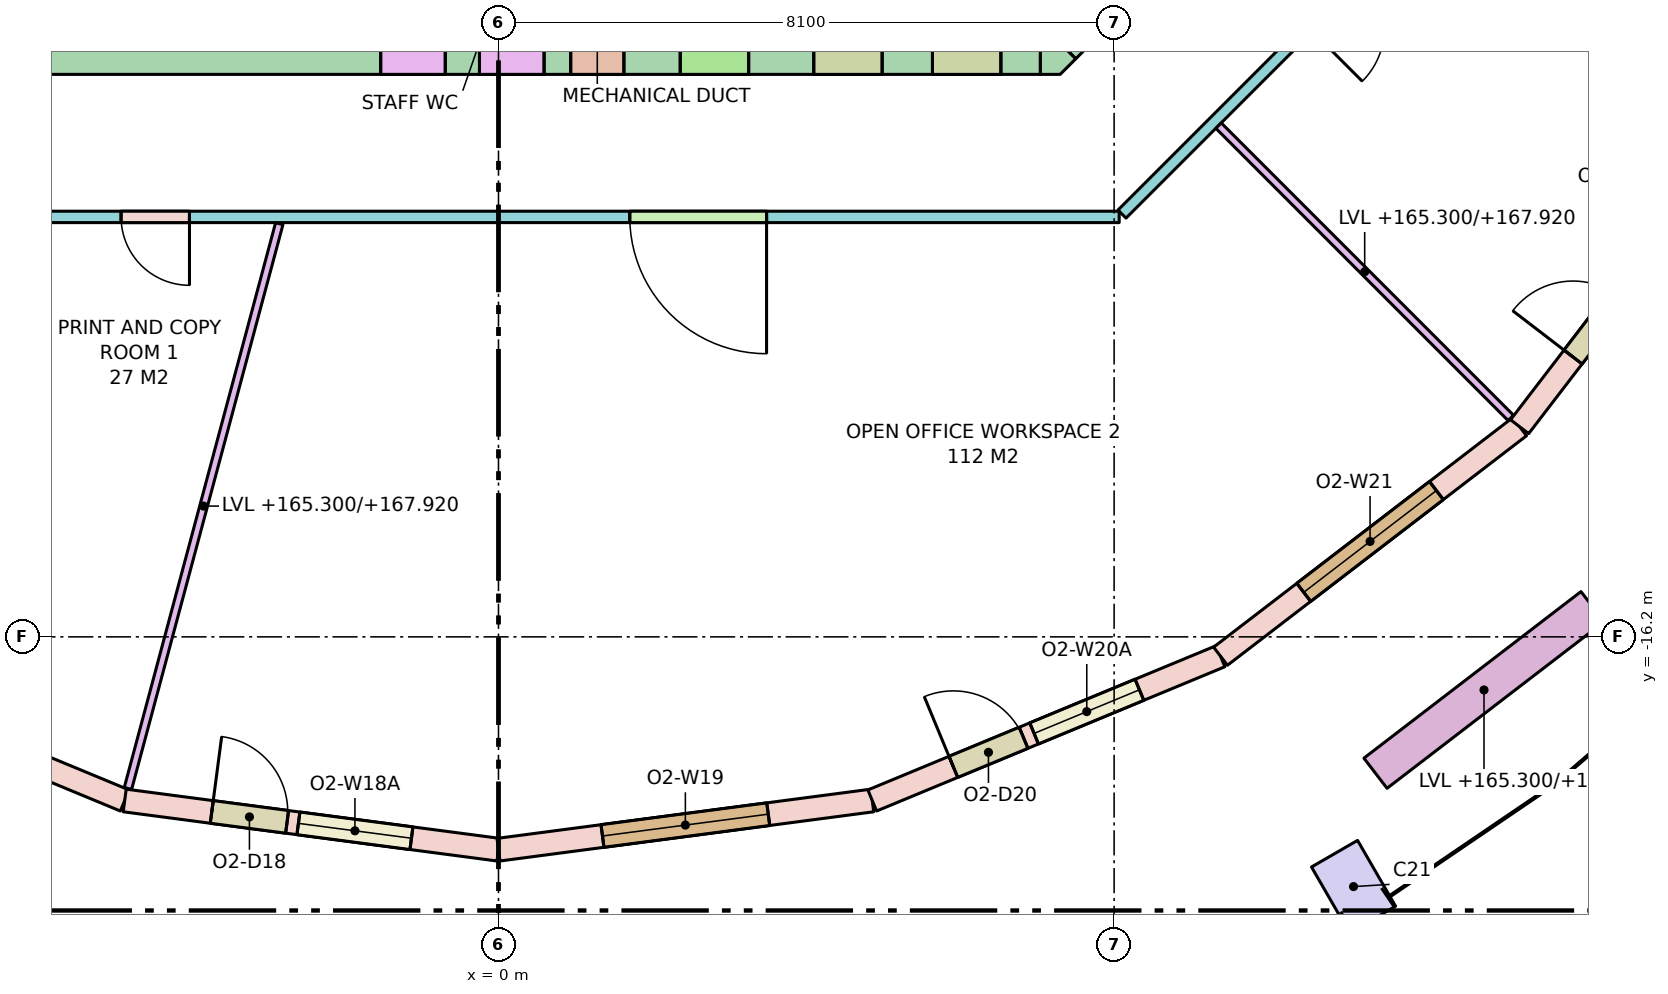
"""IFC4 building model, lengths in metres.
Left out: names, types, materials, properties, quantities, classifications, styles, units other than length and angle.
Written with IfcOpenShell. Run it as: python <this file> out.ifc"""

import sys

from ifc_helpers import new_model, si_unit, direction, frame, frame_2d, origin, origin_2d, place, context, subcontext, project, spatial, polyline, rectangle, outline, extrude, element, fill, save


model = new_model("IFC4")
c1 = context("Model", 3, precision=1e-05, world=origin(), true_north=direction((0.0, 1.0)))
c2 = subcontext(c1, "Body", "Model", "MODEL_VIEW")
j1 = project(units=[si_unit("LENGTHUNIT", "METRE"), si_unit("PLANEANGLEUNIT", "RADIAN")], contexts=[c1])
p1 = place(None, origin())
s1 = spatial("IfcSite", under=j1, at=p1, CompositionType="ELEMENT")
p2 = place(p1, origin())
s2 = spatial("IfcBuilding", under=s1, at=p2, CompositionType="ELEMENT")
p3 = place(p2, frame((0.0, 0.0, 165.3)))
s3 = spatial("IfcBuildingStorey", under=s2, at=p3, CompositionType="ELEMENT", Elevation=165.3)
p4 = place(p3, frame((11.25, -19.486, 0.0), z_axis=(0.0, 0.0, 1.0), x_axis=(0.866025403784, 0.5, 0.0)))
e1 = element("IfcColumn", 1, at=p4, inside=s3, PredefinedType="COLUMN", context=c2, shape_type="SweptSolid", body=[
    extrude(rectangle(XDim=0.7, YDim=1.0, at=origin_2d()), origin(), (0.0, 0.0, 1.0), 3.7),
])
p5 = place(p3, frame((-7.13, -8.45, -0.28), z_axis=(0.0, 0.0, 1.0), x_axis=(1.0, 0.0, 0.0)))
e2 = element("IfcWall", 2, at=p5, inside=s3, PredefinedType="SHEAR", context=c2, shape_type="SweptSolid", body=[
    extrude(rectangle(XDim=14.26, YDim=0.7, at=frame_2d((7.13, 0.0))), origin(), (0.0, 0.0, 1.0), 3.7),
])
p6 = place(p5, frame((8.08, 0.0, 0.28)))
e3 = element("IfcOpeningElement", 3, at=p6, cuts=e2, PredefinedType="OPENING", context=c2, shape_type="SweptSolid", body=[
    extrude(rectangle(XDim=0.7, YDim=2.1, at=frame_2d((0.35, 1.05))), frame((0.0, 0.36, 0.0), z_axis=(0.0, -1.0, 0.0), x_axis=(1.0, 0.0, 0.0)), (0.0, 0.0, 1.0), 0.72),
])
p7 = place(p5, frame((5.58, 0.0, 0.28)))
e4 = element("IfcOpeningElement", 4, at=p7, cuts=e2, PredefinedType="OPENING", context=c2, shape_type="SweptSolid", body=[
    extrude(rectangle(XDim=0.85, YDim=2.1, at=frame_2d((0.425, 1.05))), frame((0.0, 0.36, 0.0), z_axis=(0.0, -1.0, 0.0), x_axis=(1.0, 0.0, 0.0)), (0.0, 0.0, 1.0), 0.72),
])
p8 = place(p5, frame((6.88, 0.0, 0.28)))
e5 = element("IfcOpeningElement", 5, at=p8, cuts=e2, PredefinedType="OPENING", context=c2, shape_type="SweptSolid", body=[
    extrude(rectangle(XDim=0.85, YDim=2.1, at=frame_2d((0.425, 1.05))), frame((0.0, 0.36, 0.0), z_axis=(0.0, -1.0, 0.0), x_axis=(1.0, 0.0, 0.0)), (0.0, 0.0, 1.0), 0.72),
])
p9 = place(p5, frame((9.521, 0.0, 0.28)))
e6 = element("IfcOpeningElement", 6, at=p9, cuts=e2, PredefinedType="OPENING", context=c2, shape_type="SweptSolid", body=[
    extrude(rectangle(XDim=0.9, YDim=2.1, at=frame_2d((0.45, 1.05))), frame((0.0, 0.36, 0.0), z_axis=(0.0, -1.0, 0.0), x_axis=(1.0, 0.0, 0.0)), (0.0, 0.0, 1.0), 0.72),
])
p10 = place(p5, frame((11.278, 0.0, 0.28)))
e7 = element("IfcOpeningElement", 7, at=p10, cuts=e2, PredefinedType="OPENING", context=c2, shape_type="SweptSolid", body=[
    extrude(rectangle(XDim=0.9, YDim=2.1, at=frame_2d((0.45, 1.05))), frame((0.0, 0.36, 0.0), z_axis=(0.0, -1.0, 0.0), x_axis=(1.0, 0.0, 0.0)), (0.0, 0.0, 1.0), 0.72),
])
p11 = place(p5, frame((12.84, 0.0, 0.28)))
e8 = element("IfcOpeningElement", 8, at=p11, cuts=e2, PredefinedType="OPENING", context=c2, shape_type="SweptSolid", body=[
    extrude(rectangle(XDim=0.9, YDim=2.1, at=frame_2d((0.45, 1.05))), frame((0.0, 0.36, 0.0), z_axis=(0.0, -1.0, 0.0), x_axis=(1.0, 0.0, 0.0)), (0.0, 0.0, 1.0), 0.72),
])
p12 = place(p3, frame((10.347, -5.347, -0.28), z_axis=(0.0, 0.0, 1.0), x_axis=(-0.707106781187, -0.707106781187, 0.0)))
e9 = element("IfcWall", 9, at=p12, inside=s3, PredefinedType="SHEAR", context=c2, shape_type="SweptSolid", body=[
    extrude(rectangle(XDim=4.243, YDim=0.7, at=frame_2d((2.121, 0.0))), origin(), (0.0, 0.0, 1.0), 3.7),
])
p13 = place(p12, frame((0.52, 0.0, 0.28)))
e10 = element("IfcOpeningElement", 10, at=p13, cuts=e9, PredefinedType="OPENING", context=c2, shape_type="SweptSolid", body=[
    extrude(rectangle(XDim=0.9, YDim=2.1, at=frame_2d((0.45, 1.05))), frame((0.0, 0.36, 0.0), z_axis=(0.0, -1.0, 0.0), x_axis=(1.0, 0.0, 0.0)), (0.0, 0.0, 1.0), 0.72),
])
p14 = place(p3, frame((0.0, 0.0, -0.28)))
e11 = element("IfcWall", 11, at=p14, inside=s3, PredefinedType="SHEAR", context=c2, shape_type="SweptSolid", body=[
    extrude(outline(polyline([(7.39, -8.8), (7.13, -8.8), (7.13, -8.8), (7.13, -8.13), (7.595, -8.595), (7.595, -8.595), (7.595, -8.595), (7.39, -8.8)])), origin(), (0.0, 0.0, 1.0), 3.7),
])
p15 = place(p3, frame((-9.5, -16.455, 0.0), z_axis=(0.0, 0.0, 1.0), x_axis=(0.923893254961, -0.382650301762, 0.0)))
e12 = element("IfcWall", 12, at=p15, inside=s3, PredefinedType="STANDARD", context=c2, shape_type="SweptSolid", body=[
    extrude(rectangle(XDim=4.96, YDim=0.3, at=frame_2d((2.48, 0.0))), origin(), (0.0, 0.0, 1.0), 3.42),
])
p16 = place(p15, frame((1.38, 0.0, 0.8)))
e13 = element("IfcOpeningElement", 13, at=p16, cuts=e12, PredefinedType="OPENING", context=c2, shape_type="SweptSolid", body=[
    extrude(rectangle(XDim=2.2, YDim=2.4, at=frame_2d((1.1, 1.2))), frame((0.0, 0.16, 0.0), z_axis=(0.0, -1.0, 0.0), x_axis=(1.0, 0.0, 0.0)), (0.0, 0.0, 1.0), 0.32),
])
p17 = place(p3, frame((-4.917, -18.353, 0.0), z_axis=(0.0, 0.0, 1.0), x_axis=(0.991443234469, -0.130538549191, 0.0)))
e14 = element("IfcWall", 14, at=p17, inside=s3, PredefinedType="STANDARD", context=c2, shape_type="SweptSolid", body=[
    extrude(rectangle(XDim=4.96, YDim=0.3, at=frame_2d((2.48, 0.0))), origin(), (0.0, 0.0, 1.0), 3.42),
])
p18 = place(p17, frame((1.155, 0.0, 0.0)))
e15 = element("IfcOpeningElement", 15, at=p18, cuts=e14, PredefinedType="OPENING", context=c2, shape_type="SweptSolid", body=[
    extrude(rectangle(XDim=1.0, YDim=2.4, at=frame_2d((0.5, 1.2))), frame((0.0, 0.16, 0.0), z_axis=(0.0, -1.0, 0.0), x_axis=(1.0, 0.0, 0.0)), (0.0, 0.0, 1.0), 0.32),
])
p19 = place(p17, frame((2.305, 0.0, 0.8)))
e16 = element("IfcOpeningElement", 16, at=p19, cuts=e14, PredefinedType="OPENING", context=c2, shape_type="SweptSolid", body=[
    extrude(rectangle(XDim=1.5, YDim=2.4, at=frame_2d((0.75, 1.2))), frame((0.0, 0.16, 0.0), z_axis=(0.0, -1.0, 0.0), x_axis=(1.0, 0.0, 0.0)), (0.0, 0.0, 1.0), 0.32),
])
p20 = place(p3, frame((0.0, -19.0, 0.0), z_axis=(0.0, 0.0, 1.0), x_axis=(0.991443234469, 0.130538549191, 0.0)))
e17 = element("IfcWall", 17, at=p20, inside=s3, PredefinedType="STANDARD", context=c2, shape_type="SweptSolid", body=[
    extrude(rectangle(XDim=4.96, YDim=0.3, at=frame_2d((2.48, 0.0))), origin(), (0.0, 0.0, 1.0), 3.42),
])
p21 = place(p20, frame((1.38, 0.0, 0.8)))
e18 = element("IfcOpeningElement", 18, at=p21, cuts=e17, PredefinedType="OPENING", context=c2, shape_type="SweptSolid", body=[
    extrude(rectangle(XDim=2.2, YDim=2.4, at=frame_2d((1.1, 1.2))), frame((0.0, 0.16, 0.0), z_axis=(0.0, -1.0, 0.0), x_axis=(1.0, 0.0, 0.0)), (0.0, 0.0, 1.0), 0.32),
])
p22 = place(p3, frame((4.917, -18.353, 0.0), z_axis=(0.0, 0.0, 1.0), x_axis=(0.923893254961, 0.382650301762, 0.0)))
e19 = element("IfcWall", 19, at=p22, inside=s3, PredefinedType="STANDARD", context=c2, shape_type="SweptSolid", body=[
    extrude(rectangle(XDim=4.96, YDim=0.3, at=frame_2d((2.48, 0.0))), origin(), (0.0, 0.0, 1.0), 3.42),
])
p23 = place(p22, frame((1.155, 0.0, 0.0)))
e20 = element("IfcOpeningElement", 20, at=p23, cuts=e19, PredefinedType="OPENING", context=c2, shape_type="SweptSolid", body=[
    extrude(rectangle(XDim=1.0, YDim=2.4, at=frame_2d((0.5, 1.2))), frame((0.0, 0.16, 0.0), z_axis=(0.0, -1.0, 0.0), x_axis=(1.0, 0.0, 0.0)), (0.0, 0.0, 1.0), 0.32),
])
p24 = place(p22, frame((2.305, 0.0, 0.8)))
e21 = element("IfcOpeningElement", 21, at=p24, cuts=e19, PredefinedType="OPENING", context=c2, shape_type="SweptSolid", body=[
    extrude(rectangle(XDim=1.5, YDim=2.4, at=frame_2d((0.75, 1.2))), frame((0.0, 0.16, 0.0), z_axis=(0.0, -1.0, 0.0), x_axis=(1.0, 0.0, 0.0)), (0.0, 0.0, 1.0), 0.32),
])
p25 = place(p3, frame((9.5, -16.455, 0.0), z_axis=(0.0, 0.0, 1.0), x_axis=(0.793348024649, 0.608768356425, 0.0)))
e22 = element("IfcWall", 22, at=p25, inside=s3, PredefinedType="STANDARD", context=c2, shape_type="SweptSolid", body=[
    extrude(rectangle(XDim=4.96, YDim=0.3, at=frame_2d((2.48, 0.0))), origin(), (0.0, 0.0, 1.0), 3.42),
])
p26 = place(p25, frame((1.38, 0.0, 0.8)))
e23 = element("IfcOpeningElement", 23, at=p26, cuts=e22, PredefinedType="OPENING", context=c2, shape_type="SweptSolid", body=[
    extrude(rectangle(XDim=2.2, YDim=2.4, at=frame_2d((1.1, 1.2))), frame((0.0, 0.16, 0.0), z_axis=(0.0, -1.0, 0.0), x_axis=(1.0, 0.0, 0.0)), (0.0, 0.0, 1.0), 0.32),
])
p27 = place(p3, frame((13.435, -13.435, 0.0), z_axis=(0.0, 0.0, 1.0), x_axis=(0.608768356425, 0.793348024649, 0.0)))
e24 = element("IfcWall", 24, at=p27, inside=s3, PredefinedType="STANDARD", context=c2, shape_type="SweptSolid", body=[
    extrude(rectangle(XDim=4.96, YDim=0.3, at=frame_2d((2.48, 0.0))), origin(), (0.0, 0.0, 1.0), 3.42),
])
p28 = place(p27, frame((1.155, 0.0, 0.0)))
e25 = element("IfcOpeningElement", 25, at=p28, cuts=e24, PredefinedType="OPENING", context=c2, shape_type="SweptSolid", body=[
    extrude(rectangle(XDim=1.0, YDim=2.4, at=frame_2d((0.5, 1.2))), frame((0.0, 0.16, 0.0), z_axis=(0.0, -1.0, 0.0), x_axis=(1.0, 0.0, 0.0)), (0.0, 0.0, 1.0), 0.32),
])
p29 = place(p27, frame((2.305, 0.0, 0.8)))
e26 = element("IfcOpeningElement", 26, at=p29, cuts=e24, PredefinedType="OPENING", context=c2, shape_type="SweptSolid", body=[
    extrude(rectangle(XDim=1.5, YDim=2.4, at=frame_2d((0.75, 1.2))), frame((0.0, 0.16, 0.0), z_axis=(0.0, -1.0, 0.0), x_axis=(1.0, 0.0, 0.0)), (0.0, 0.0, 1.0), 0.32),
])
p30 = place(p3, frame((11.539, -17.994, 0.0), z_axis=(0.0, 0.0, 1.0), x_axis=(0.793384730612, 0.608720518162, 0.0)))
e27 = element("IfcWall", 27, at=p30, inside=s3, PredefinedType="PARAPET", context=c2, shape_type="SweptSolid", body=[
    extrude(rectangle(XDim=3.6, YDim=0.5, at=frame_2d((1.8, 0.0))), origin(), (0.0, 0.0, 1.0), 0.9),
])
p31 = place(p3, frame((12.638, -6.204, 0.0), z_axis=(0.0, 0.0, 1.0), x_axis=(-0.707106781187, -0.707106781187, 0.0)))
e28 = element("IfcWall", 28, at=p31, inside=s3, PredefinedType="PARTITIONING", context=c2, shape_type="SweptSolid", body=[
    extrude(rectangle(XDim=6.271, YDim=0.15, at=frame_2d((3.135, 0.0))), origin(), (0.0, 0.0, 1.0), 2.62),
])
p32 = place(p31, frame((1.8, 0.0, 0.0)))
e29 = element("IfcOpeningElement", 29, at=p32, cuts=e28, PredefinedType="OPENING", context=c2, shape_type="SweptSolid", body=[
    extrude(rectangle(XDim=1.0, YDim=2.1, at=frame_2d((0.5, 1.05))), frame((0.0, 0.085, 0.0), z_axis=(0.0, -1.0, 0.0), x_axis=(1.0, 0.0, 0.0)), (0.0, 0.0, 1.0), 0.17),
])
p33 = place(p3, frame((8.167, -10.675, 0.0), z_axis=(0.0, 0.0, 1.0), x_axis=(-1.0, 0.0, 0.0)))
e30 = element("IfcWall", 30, at=p33, inside=s3, PredefinedType="PARTITIONING", context=c2, shape_type="SweptSolid", body=[
    extrude(rectangle(XDim=16.333, YDim=0.15, at=frame_2d((8.167, 0.0))), origin(), (0.0, 0.0, 1.0), 2.62),
])
p34 = place(p33, frame((12.232, 0.0, 0.0)))
e31 = element("IfcOpeningElement", 31, at=p34, cuts=e30, PredefinedType="OPENING", context=c2, shape_type="SweptSolid", body=[
    extrude(rectangle(XDim=0.9, YDim=2.1, at=frame_2d((0.45, 1.05))), frame((0.0, 0.085, 0.0), z_axis=(0.0, -1.0, 0.0), x_axis=(1.0, 0.0, 0.0)), (0.0, 0.0, 1.0), 0.17),
])
p35 = place(p33, frame((4.639, 0.0, 0.0)))
e32 = element("IfcOpeningElement", 32, at=p35, cuts=e30, PredefinedType="OPENING", context=c2, shape_type="SweptSolid", body=[
    extrude(rectangle(XDim=1.8, YDim=2.1, at=frame_2d((0.9, 1.05))), frame((0.0, 0.085, 0.0), z_axis=(0.0, -1.0, 0.0), x_axis=(1.0, 0.0, 0.0)), (0.0, 0.0, 1.0), 0.17),
])
p36 = place(p3, frame((-2.884, -10.764, 0.0), z_axis=(0.0, 0.0, 1.0), x_axis=(-0.25881804804, -0.965926093451, 0.0)))
e33 = element("IfcWall", 33, at=p36, inside=s3, PredefinedType="PARTITIONING", context=c2, shape_type="SweptSolid", body=[
    extrude(rectangle(XDim=7.693, YDim=0.1, at=frame_2d((3.846, 0.0))), origin(), (0.0, 0.0, 1.0), 2.62),
])
p37 = place(p3, frame((9.474, -9.474, 0.0), z_axis=(0.0, 0.0, 1.0), x_axis=(0.707106781187, -0.707106781187, 0.0)))
e34 = element("IfcWall", 34, at=p37, inside=s3, PredefinedType="PARTITIONING", context=c2, shape_type="SweptSolid", body=[
    extrude(rectangle(XDim=5.439, YDim=0.1, at=frame_2d((2.719, 0.0))), origin(), (0.0, 0.0, 1.0), 2.62),
])
p38 = place(p18, origin())
e35 = element("IfcDoor", 35, at=p38, inside=s3, OperationType="SINGLE_SWING_LEFT", PredefinedType="DOOR", context=c2, shape_type="SweptSolid", body=[
    extrude(rectangle(XDim=1.0, YDim=2.4, at=frame_2d((0.5, 1.2))), frame((0.0, 0.025, 0.0), z_axis=(0.0, -1.0, 0.0), x_axis=(1.0, 0.0, 0.0)), (0.0, 0.0, 1.0), 0.05),
])
fill(e15, e35)
p39 = place(p19, origin())
e36 = element("IfcWindow", 36, at=p39, inside=s3, PartitioningType="SINGLE_PANEL", PredefinedType="WINDOW", context=c2, shape_type="SweptSolid", body=[
    extrude(rectangle(XDim=1.5, YDim=2.4, at=frame_2d((0.75, 1.2))), frame((0.0, 0.03, 0.0), z_axis=(0.0, -1.0, 0.0), x_axis=(1.0, 0.0, 0.0)), (0.0, 0.0, 1.0), 0.06),
])
fill(e16, e36)
p40 = place(p21, origin())
e37 = element("IfcWindow", 37, at=p40, inside=s3, PartitioningType="SINGLE_PANEL", PredefinedType="WINDOW", context=c2, shape_type="SweptSolid", body=[
    extrude(rectangle(XDim=2.2, YDim=2.4, at=frame_2d((1.1, 1.2))), frame((0.0, 0.03, 0.0), z_axis=(0.0, -1.0, 0.0), x_axis=(1.0, 0.0, 0.0)), (0.0, 0.0, 1.0), 0.06),
])
fill(e18, e37)
p41 = place(p23, origin())
e38 = element("IfcDoor", 38, at=p41, inside=s3, OperationType="SINGLE_SWING_LEFT", PredefinedType="DOOR", context=c2, shape_type="SweptSolid", body=[
    extrude(rectangle(XDim=1.0, YDim=2.4, at=frame_2d((0.5, 1.2))), frame((0.0, 0.025, 0.0), z_axis=(0.0, -1.0, 0.0), x_axis=(1.0, 0.0, 0.0)), (0.0, 0.0, 1.0), 0.05),
])
fill(e20, e38)
p42 = place(p24, origin())
e39 = element("IfcWindow", 39, at=p42, inside=s3, PartitioningType="SINGLE_PANEL", PredefinedType="WINDOW", context=c2, shape_type="SweptSolid", body=[
    extrude(rectangle(XDim=1.5, YDim=2.4, at=frame_2d((0.75, 1.2))), frame((0.0, 0.03, 0.0), z_axis=(0.0, -1.0, 0.0), x_axis=(1.0, 0.0, 0.0)), (0.0, 0.0, 1.0), 0.06),
])
fill(e21, e39)
p43 = place(p26, origin())
e40 = element("IfcWindow", 40, at=p43, inside=s3, PartitioningType="SINGLE_PANEL", PredefinedType="WINDOW", context=c2, shape_type="SweptSolid", body=[
    extrude(rectangle(XDim=2.2, YDim=2.4, at=frame_2d((1.1, 1.2))), frame((0.0, 0.03, 0.0), z_axis=(0.0, -1.0, 0.0), x_axis=(1.0, 0.0, 0.0)), (0.0, 0.0, 1.0), 0.06),
])
fill(e23, e40)
p44 = place(p28, origin())
e41 = element("IfcDoor", 41, at=p44, inside=s3, OperationType="SINGLE_SWING_LEFT", PredefinedType="DOOR", context=c2, shape_type="SweptSolid", body=[
    extrude(rectangle(XDim=1.0, YDim=2.4, at=frame_2d((0.5, 1.2))), frame((0.0, 0.025, 0.0), z_axis=(0.0, -1.0, 0.0), x_axis=(1.0, 0.0, 0.0)), (0.0, 0.0, 1.0), 0.05),
])
fill(e25, e41)
p45 = place(p34, origin())
e42 = element("IfcDoor", 42, at=p45, inside=s3, OperationType="SINGLE_SWING_LEFT", PredefinedType="DOOR", context=c2, shape_type="SweptSolid", body=[
    extrude(rectangle(XDim=0.9, YDim=2.1, at=frame_2d((0.45, 1.05))), frame((0.0, 0.025, 0.0), z_axis=(0.0, -1.0, 0.0), x_axis=(1.0, 0.0, 0.0)), (0.0, 0.0, 1.0), 0.05),
])
fill(e31, e42)
p46 = place(p35, origin())
e43 = element("IfcDoor", 43, at=p46, inside=s3, OperationType="DOUBLE_DOOR_SINGLE_SWING", PredefinedType="DOOR", context=c2, shape_type="SweptSolid", body=[
    extrude(rectangle(XDim=1.8, YDim=2.1, at=frame_2d((0.9, 1.05))), frame((0.0, 0.025, 0.0), z_axis=(0.0, -1.0, 0.0), x_axis=(1.0, 0.0, 0.0)), (0.0, 0.0, 1.0), 0.05),
])
fill(e32, e43)
save(model, sys.argv[1])
